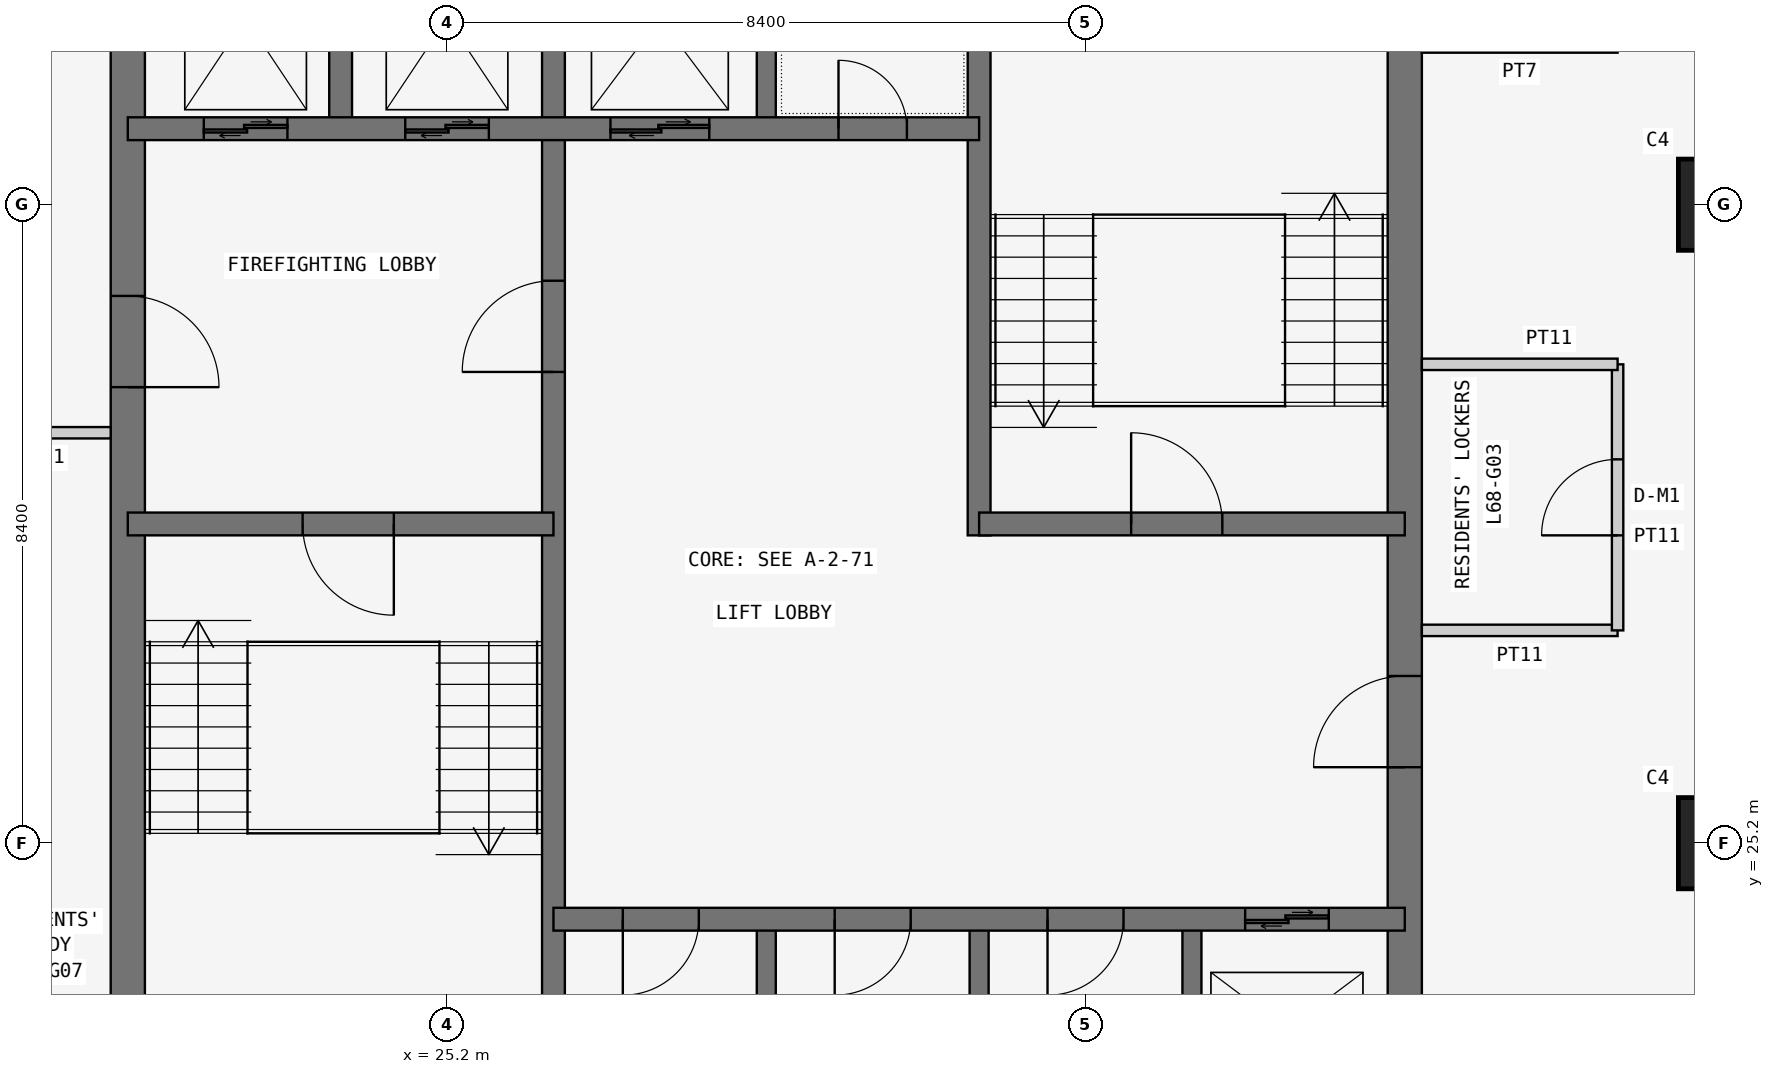
"""IFC4 building model, lengths in metres.
Left out: names, types, materials, properties, quantities, classifications, styles, units other than length and angle.
Written with IfcOpenShell. Run it as: python <this file> out.ifc"""

import sys

from ifc_helpers import new_model, si_unit, direction, frame, frame_2d, origin, origin_2d, place, context, subcontext, project, spatial, rectangle, extrude, element, fill, save


model = new_model("IFC4")
c1 = context("Model", 3, precision=1e-05, world=origin(), true_north=direction((0.0, 1.0)))
c2 = subcontext(c1, "Body", "Model", "MODEL_VIEW")
j1 = project(units=[si_unit("LENGTHUNIT", "METRE"), si_unit("PLANEANGLEUNIT", "RADIAN")], contexts=[c1])
p1 = place(None, origin())
s1 = spatial("IfcSite", under=j1, at=p1, CompositionType="ELEMENT")
p2 = place(p1, origin())
s2 = spatial("IfcBuilding", under=s1, at=p2, CompositionType="ELEMENT")
p3 = place(p2, frame((0.0, 0.0, 261.3)))
s3 = spatial("IfcBuildingStorey", under=s2, at=p3, CompositionType="ELEMENT", Elevation=261.3)
for number, where, z_axis, x_axis in (
    (1, (42.0, 25.2, 0.0), (0.0, 0.0, 1.0), (1.0, 0.0, 0.0)),
    (2, (42.0, 33.6, 0.0), (0.0, 0.0, 1.0), (1.0, 0.0, 0.0)),
):
    element("IfcColumn", number, at=place(p3, frame(where, z_axis=z_axis, x_axis=x_axis)), inside=s3, PredefinedType="COLUMN", context=c2, shape_type="SweptSolid", body=[
        extrude(rectangle(XDim=1.2, YDim=1.2, at=origin_2d()), origin(), (0.0, 0.0, 1.0), 3.6),
    ])
p4 = place(p3, frame((37.8, 21.0, 0.0), z_axis=(0.0, 0.0, 1.0), x_axis=(0.0, 1.0, 0.0)))
e3 = element("IfcWall", 3, at=p4, inside=s3, PredefinedType="SHEAR", context=c2, shape_type="SweptSolid", body=[
    extrude(rectangle(XDim=17.025, YDim=0.45, at=frame_2d((8.512, 0.0))), origin(), (0.0, 0.0, 1.0), 3.6),
])
p5 = place(p4, frame((5.2, 0.0, 0.0)))
e4 = element("IfcOpeningElement", 4, at=p5, cuts=e3, PredefinedType="OPENING", context=c2, shape_type="SweptSolid", body=[
    extrude(rectangle(XDim=1.2, YDim=2.1, at=frame_2d((0.6, 1.05))), frame((0.0, 0.235, 0.0), z_axis=(0.0, -1.0, 0.0), x_axis=(1.0, 0.0, 0.0)), (0.0, 0.0, 1.0), 0.47),
])
p6 = place(p3, frame((21.0, 37.8, 0.0), z_axis=(0.0, 0.0, 1.0), x_axis=(0.0, -1.0, 0.0)))
e5 = element("IfcWall", 5, at=p6, inside=s3, PredefinedType="SHEAR", context=c2, shape_type="SweptSolid", body=[
    extrude(rectangle(XDim=17.025, YDim=0.45, at=frame_2d((8.513, 0.0))), origin(), (0.0, 0.0, 1.0), 3.6),
])
p7 = place(p6, frame((5.4, 0.0, 0.0)))
e6 = element("IfcOpeningElement", 6, at=p7, cuts=e5, PredefinedType="OPENING", context=c2, shape_type="SweptSolid", body=[
    extrude(rectangle(XDim=1.2, YDim=2.1, at=frame_2d((0.6, 1.05))), frame((0.0, 0.235, 0.0), z_axis=(0.0, -1.0, 0.0), x_axis=(1.0, 0.0, 0.0)), (0.0, 0.0, 1.0), 0.47),
])
p8 = place(p3, frame((26.6, 21.0, 0.0), z_axis=(0.0, 0.0, 1.0), x_axis=(0.0, 1.0, 0.0)))
e7 = element("IfcWall", 7, at=p8, inside=s3, PredefinedType="SHEAR", context=c2, shape_type="SweptSolid", body=[
    extrude(rectangle(XDim=16.8, YDim=0.3, at=frame_2d((8.4, 0.0))), origin(), (0.0, 0.0, 1.0), 3.6),
])
p9 = place(p8, frame((10.4, 0.0, 0.0)))
e8 = element("IfcOpeningElement", 8, at=p9, cuts=e7, PredefinedType="OPENING", context=c2, shape_type="SweptSolid", body=[
    extrude(rectangle(XDim=1.2, YDim=2.1, at=frame_2d((0.6, 1.05))), frame((0.0, 0.16, 0.0), z_axis=(0.0, -1.0, 0.0), x_axis=(1.0, 0.0, 0.0)), (0.0, 0.0, 1.0), 0.32),
])
p10 = place(p3, frame((21.0, 29.4, 0.0), z_axis=(0.0, 0.0, 1.0), x_axis=(1.0, 0.0, 0.0)))
e9 = element("IfcWall", 9, at=p10, inside=s3, PredefinedType="SHEAR", context=c2, shape_type="SweptSolid", body=[
    extrude(rectangle(XDim=5.6, YDim=0.3, at=frame_2d((2.8, 0.0))), origin(), (0.0, 0.0, 1.0), 3.6),
])
p11 = place(p10, frame((2.3, 0.0, 0.0)))
e10 = element("IfcOpeningElement", 10, at=p11, cuts=e9, PredefinedType="OPENING", context=c2, shape_type="SweptSolid", body=[
    extrude(rectangle(XDim=1.2, YDim=2.1, at=frame_2d((0.6, 1.05))), frame((0.0, 0.16, 0.0), z_axis=(0.0, -1.0, 0.0), x_axis=(1.0, 0.0, 0.0)), (0.0, 0.0, 1.0), 0.32),
])
p12 = place(p3, frame((21.0, 34.6, 0.0), z_axis=(0.0, 0.0, 1.0), x_axis=(1.0, 0.0, 0.0)))
e11 = element("IfcWall", 11, at=p12, inside=s3, PredefinedType="SHEAR", context=c2, shape_type="SweptSolid", body=[
    extrude(rectangle(XDim=11.2, YDim=0.3, at=frame_2d((5.6, 0.0))), origin(), (0.0, 0.0, 1.0), 3.6),
])
p13 = place(p12, frame((9.35, 0.0, 0.0)))
e12 = element("IfcOpeningElement", 12, at=p13, cuts=e11, PredefinedType="OPENING", context=c2, shape_type="SweptSolid", body=[
    extrude(rectangle(XDim=0.9, YDim=2.1, at=frame_2d((0.45, 1.05))), frame((0.0, 0.16, 0.0), z_axis=(0.0, -1.0, 0.0), x_axis=(1.0, 0.0, 0.0)), (0.0, 0.0, 1.0), 0.32),
])
p14 = place(p12, frame((1.0, 0.0, 0.0)))
e13 = element("IfcOpeningElement", 13, at=p14, cuts=e11, PredefinedType="OPENING", context=c2, shape_type="SweptSolid", body=[
    extrude(rectangle(XDim=1.1, YDim=2.1, at=frame_2d((0.55, 1.05))), frame((0.0, 0.16, 0.0), z_axis=(0.0, -1.0, 0.0), x_axis=(1.0, 0.0, 0.0)), (0.0, 0.0, 1.0), 0.32),
])
p15 = place(p12, frame((3.65, 0.0, 0.0)))
e14 = element("IfcOpeningElement", 14, at=p15, cuts=e11, PredefinedType="OPENING", context=c2, shape_type="SweptSolid", body=[
    extrude(rectangle(XDim=1.1, YDim=2.1, at=frame_2d((0.55, 1.05))), frame((0.0, 0.16, 0.0), z_axis=(0.0, -1.0, 0.0), x_axis=(1.0, 0.0, 0.0)), (0.0, 0.0, 1.0), 0.32),
])
p16 = place(p12, frame((6.35, 0.0, 0.0)))
e15 = element("IfcOpeningElement", 15, at=p16, cuts=e11, PredefinedType="OPENING", context=c2, shape_type="SweptSolid", body=[
    extrude(rectangle(XDim=1.3, YDim=2.1, at=frame_2d((0.65, 1.05))), frame((0.0, 0.16, 0.0), z_axis=(0.0, -1.0, 0.0), x_axis=(1.0, 0.0, 0.0)), (0.0, 0.0, 1.0), 0.32),
])
p17 = place(p3, frame((23.8, 34.6, 0.0), z_axis=(0.0, 0.0, 1.0), x_axis=(0.0, 1.0, 0.0)))
e16 = element("IfcWall", 16, at=p17, inside=s3, PredefinedType="SHEAR", context=c2, shape_type="SweptSolid", body=[
    extrude(rectangle(XDim=3.2, YDim=0.3, at=frame_2d((1.6, 0.0))), origin(), (0.0, 0.0, 1.0), 3.6),
])
p18 = place(p3, frame((26.6, 24.2, 0.0), z_axis=(0.0, 0.0, 1.0), x_axis=(1.0, 0.0, 0.0)))
e17 = element("IfcWall", 17, at=p18, inside=s3, PredefinedType="SHEAR", context=c2, shape_type="SweptSolid", body=[
    extrude(rectangle(XDim=11.2, YDim=0.3, at=frame_2d((5.6, 0.0))), origin(), (0.0, 0.0, 1.0), 3.6),
])
p19 = place(p18, frame((0.913, 0.0, 0.0)))
e18 = element("IfcOpeningElement", 18, at=p19, cuts=e17, PredefinedType="OPENING", context=c2, shape_type="SweptSolid", body=[
    extrude(rectangle(XDim=1.0, YDim=2.1, at=frame_2d((0.5, 1.05))), frame((0.0, 0.16, 0.0), z_axis=(0.0, -1.0, 0.0), x_axis=(1.0, 0.0, 0.0)), (0.0, 0.0, 1.0), 0.32),
])
p20 = place(p18, frame((3.7, 0.0, 0.0)))
e19 = element("IfcOpeningElement", 19, at=p20, cuts=e17, PredefinedType="OPENING", context=c2, shape_type="SweptSolid", body=[
    extrude(rectangle(XDim=1.0, YDim=2.1, at=frame_2d((0.5, 1.05))), frame((0.0, 0.16, 0.0), z_axis=(0.0, -1.0, 0.0), x_axis=(1.0, 0.0, 0.0)), (0.0, 0.0, 1.0), 0.32),
])
p21 = place(p18, frame((6.5, 0.0, 0.0)))
e20 = element("IfcOpeningElement", 20, at=p21, cuts=e17, PredefinedType="OPENING", context=c2, shape_type="SweptSolid", body=[
    extrude(rectangle(XDim=1.0, YDim=2.1, at=frame_2d((0.5, 1.05))), frame((0.0, 0.16, 0.0), z_axis=(0.0, -1.0, 0.0), x_axis=(1.0, 0.0, 0.0)), (0.0, 0.0, 1.0), 0.32),
])
p22 = place(p18, frame((9.1, 0.0, 0.0)))
e21 = element("IfcOpeningElement", 21, at=p22, cuts=e17, PredefinedType="OPENING", context=c2, shape_type="SweptSolid", body=[
    extrude(rectangle(XDim=1.1, YDim=2.1, at=frame_2d((0.55, 1.05))), frame((0.0, 0.16, 0.0), z_axis=(0.0, -1.0, 0.0), x_axis=(1.0, 0.0, 0.0)), (0.0, 0.0, 1.0), 0.32),
])
p23 = place(p3, frame((32.2, 29.25, 0.0), z_axis=(0.0, 0.0, 1.0), x_axis=(0.0, 1.0, 0.0)))
e22 = element("IfcWall", 22, at=p23, inside=s3, PredefinedType="SHEAR", context=c2, shape_type="SweptSolid", body=[
    extrude(rectangle(XDim=8.55, YDim=0.3, at=frame_2d((4.275, 0.0))), origin(), (0.0, 0.0, 1.0), 3.6),
])
p24 = place(p3, frame((32.2, 29.4, 0.0), z_axis=(0.0, 0.0, 1.0), x_axis=(1.0, 0.0, 0.0)))
e23 = element("IfcWall", 23, at=p24, inside=s3, PredefinedType="SHEAR", context=c2, shape_type="SweptSolid", body=[
    extrude(rectangle(XDim=5.6, YDim=0.3, at=frame_2d((2.8, 0.0))), origin(), (0.0, 0.0, 1.0), 3.6),
])
p25 = place(p24, frame((2.0, 0.0, 0.0)))
e24 = element("IfcOpeningElement", 24, at=p25, cuts=e23, PredefinedType="OPENING", context=c2, shape_type="SweptSolid", body=[
    extrude(rectangle(XDim=1.2, YDim=2.1, at=frame_2d((0.6, 1.05))), frame((0.0, 0.16, 0.0), z_axis=(0.0, -1.0, 0.0), x_axis=(1.0, 0.0, 0.0)), (0.0, 0.0, 1.0), 0.32),
])
for number, where, z_axis, x_axis in (
    (25, (29.4, 21.0, 0.0), (0.0, 0.0, 1.0), (0.0, 1.0, 0.0)),
    (26, (32.2, 21.0, 0.0), (0.0, 0.0, 1.0), (0.0, 1.0, 0.0)),
    (27, (35.0, 21.0, 0.0), (0.0, 0.0, 1.0), (0.0, 1.0, 0.0)),
    (28, (29.4, 34.6, 0.0), (0.0, 0.0, 1.0), (0.0, 1.0, 0.0)),
):
    element("IfcWall", number, at=place(p3, frame(where, z_axis=z_axis, x_axis=x_axis)), inside=s3, PredefinedType="SHEAR", context=c2, shape_type="SweptSolid", body=[
        extrude(rectangle(XDim=3.2, YDim=0.25, at=frame_2d((1.6, 0.0))), origin(), (0.0, 0.0, 1.0), 3.6),
    ])
p26 = place(p3, frame((38.025, 28.0, 0.0), z_axis=(0.0, 0.0, 1.0), x_axis=(1.0, 0.0, 0.0)))
e29 = element("IfcWall", 29, at=p26, inside=s3, PredefinedType="PARTITIONING", context=c2, shape_type="SweptSolid", body=[
    extrude(rectangle(XDim=2.575, YDim=0.15, at=frame_2d((1.288, 0.0))), origin(), (0.0, 0.0, 1.0), 3.45),
])
p27 = place(p3, frame((40.6, 28.0, 0.0), z_axis=(0.0, 0.0, 1.0), x_axis=(0.0, 1.0, 0.0)))
e30 = element("IfcWall", 30, at=p27, inside=s3, PredefinedType="PARTITIONING", context=c2, shape_type="SweptSolid", body=[
    extrude(rectangle(XDim=3.5, YDim=0.15, at=frame_2d((1.75, 0.0))), origin(), (0.0, 0.0, 1.0), 3.45),
])
p28 = place(p27, frame((1.25, 0.0, 0.0)))
e31 = element("IfcOpeningElement", 31, at=p28, cuts=e30, PredefinedType="OPENING", context=c2, shape_type="SweptSolid", body=[
    extrude(rectangle(XDim=1.0, YDim=2.1, at=frame_2d((0.5, 1.05))), frame((0.0, 0.085, 0.0), z_axis=(0.0, -1.0, 0.0), x_axis=(1.0, 0.0, 0.0)), (0.0, 0.0, 1.0), 0.17),
])
p29 = place(p3, frame((40.6, 31.5, 0.0), z_axis=(0.0, 0.0, 1.0), x_axis=(-1.0, 0.0, 0.0)))
e32 = element("IfcWall", 32, at=p29, inside=s3, PredefinedType="PARTITIONING", context=c2, shape_type="SweptSolid", body=[
    extrude(rectangle(XDim=2.575, YDim=0.15, at=frame_2d((1.288, 0.0))), origin(), (0.0, 0.0, 1.0), 3.45),
])
p30 = place(p3, frame((38.025, 35.7, 0.0), z_axis=(0.0, 0.0, 1.0), x_axis=(1.0, 0.0, 0.0)))
e33 = element("IfcWall", 33, at=p30, inside=s3, PredefinedType="PARTITIONING", context=c2, shape_type="SweptSolid", body=[
    extrude(rectangle(XDim=2.575, YDim=0.2, at=frame_2d((1.288, 0.0))), origin(), (0.0, 0.0, 1.0), 3.45),
])
p31 = place(p3, frame((20.775, 30.6, 0.0), z_axis=(0.0, 0.0, 1.0), x_axis=(-1.0, 0.0, 0.0)))
e34 = element("IfcWall", 34, at=p31, inside=s3, PredefinedType="PARTITIONING", context=c2, shape_type="SweptSolid", body=[
    extrude(rectangle(XDim=1.825, YDim=0.15, at=frame_2d((0.913, 0.0))), origin(), (0.0, 0.0, 1.0), 3.45),
])
p32 = place(p28, origin())
e35 = element("IfcDoor", 35, at=p32, inside=s3, OperationType="SINGLE_SWING_LEFT", PredefinedType="DOOR", context=c2, shape_type="SweptSolid", body=[
    extrude(rectangle(XDim=1.0, YDim=2.1, at=frame_2d((0.5, 1.05))), frame((0.0, 0.025, 0.0), z_axis=(0.0, -1.0, 0.0), x_axis=(1.0, 0.0, 0.0)), (0.0, 0.0, 1.0), 0.05),
])
fill(e31, e35)
p33 = place(p7, origin())
e36 = element("IfcDoor", 36, at=p33, inside=s3, OperationType="SINGLE_SWING_RIGHT", PredefinedType="DOOR", context=c2, shape_type="SweptSolid", body=[
    extrude(rectangle(XDim=1.2, YDim=2.1, at=frame_2d((0.6, 1.05))), frame((0.0, 0.025, 0.0), z_axis=(0.0, -1.0, 0.0), x_axis=(1.0, 0.0, 0.0)), (0.0, 0.0, 1.0), 0.05),
])
fill(e6, e36)
p34 = place(p11, frame((1.2, 0.0, 0.0), z_axis=(0.0, 0.0, 1.0), x_axis=(-1.0, 0.0, 0.0)))
e37 = element("IfcDoor", 37, at=p34, inside=s3, OperationType="SINGLE_SWING_LEFT", PredefinedType="DOOR", context=c2, shape_type="SweptSolid", body=[
    extrude(rectangle(XDim=1.2, YDim=2.1, at=frame_2d((0.6, 1.05))), frame((0.0, 0.025, 0.0), z_axis=(0.0, -1.0, 0.0), x_axis=(1.0, 0.0, 0.0)), (0.0, 0.0, 1.0), 0.05),
])
fill(e10, e37)
p35 = place(p9, origin())
e38 = element("IfcDoor", 38, at=p35, inside=s3, OperationType="SINGLE_SWING_LEFT", PredefinedType="DOOR", context=c2, shape_type="SweptSolid", body=[
    extrude(rectangle(XDim=1.2, YDim=2.1, at=frame_2d((0.6, 1.05))), frame((0.0, 0.025, 0.0), z_axis=(0.0, -1.0, 0.0), x_axis=(1.0, 0.0, 0.0)), (0.0, 0.0, 1.0), 0.05),
])
fill(e8, e38)
p36 = place(p5, origin())
e39 = element("IfcDoor", 39, at=p36, inside=s3, OperationType="SINGLE_SWING_LEFT", PredefinedType="DOOR", context=c2, shape_type="SweptSolid", body=[
    extrude(rectangle(XDim=1.2, YDim=2.1, at=frame_2d((0.6, 1.05))), frame((0.0, 0.025, 0.0), z_axis=(0.0, -1.0, 0.0), x_axis=(1.0, 0.0, 0.0)), (0.0, 0.0, 1.0), 0.05),
])
fill(e4, e39)
p37 = place(p25, origin())
e40 = element("IfcDoor", 40, at=p37, inside=s3, OperationType="SINGLE_SWING_LEFT", PredefinedType="DOOR", context=c2, shape_type="SweptSolid", body=[
    extrude(rectangle(XDim=1.2, YDim=2.1, at=frame_2d((0.6, 1.05))), frame((0.0, 0.025, 0.0), z_axis=(0.0, -1.0, 0.0), x_axis=(1.0, 0.0, 0.0)), (0.0, 0.0, 1.0), 0.05),
])
fill(e24, e40)
p38 = place(p13, origin())
e41 = element("IfcDoor", 41, at=p38, inside=s3, OperationType="SINGLE_SWING_LEFT", PredefinedType="DOOR", context=c2, shape_type="SweptSolid", body=[
    extrude(rectangle(XDim=0.9, YDim=2.1, at=frame_2d((0.45, 1.05))), frame((0.0, 0.025, 0.0), z_axis=(0.0, -1.0, 0.0), x_axis=(1.0, 0.0, 0.0)), (0.0, 0.0, 1.0), 0.05),
])
fill(e12, e41)
p39 = place(p19, frame((1.0, 0.0, 0.0), z_axis=(0.0, 0.0, 1.0), x_axis=(-1.0, 0.0, 0.0)))
e42 = element("IfcDoor", 42, at=p39, inside=s3, OperationType="SINGLE_SWING_RIGHT", PredefinedType="DOOR", context=c2, shape_type="SweptSolid", body=[
    extrude(rectangle(XDim=1.0, YDim=2.1, at=frame_2d((0.5, 1.05))), frame((0.0, 0.025, 0.0), z_axis=(0.0, -1.0, 0.0), x_axis=(1.0, 0.0, 0.0)), (0.0, 0.0, 1.0), 0.05),
])
fill(e18, e42)
p40 = place(p20, frame((1.0, 0.0, 0.0), z_axis=(0.0, 0.0, 1.0), x_axis=(-1.0, 0.0, 0.0)))
e43 = element("IfcDoor", 43, at=p40, inside=s3, OperationType="SINGLE_SWING_RIGHT", PredefinedType="DOOR", context=c2, shape_type="SweptSolid", body=[
    extrude(rectangle(XDim=1.0, YDim=2.1, at=frame_2d((0.5, 1.05))), frame((0.0, 0.025, 0.0), z_axis=(0.0, -1.0, 0.0), x_axis=(1.0, 0.0, 0.0)), (0.0, 0.0, 1.0), 0.05),
])
fill(e19, e43)
p41 = place(p21, frame((1.0, 0.0, 0.0), z_axis=(0.0, 0.0, 1.0), x_axis=(-1.0, 0.0, 0.0)))
e44 = element("IfcDoor", 44, at=p41, inside=s3, OperationType="SINGLE_SWING_RIGHT", PredefinedType="DOOR", context=c2, shape_type="SweptSolid", body=[
    extrude(rectangle(XDim=1.0, YDim=2.1, at=frame_2d((0.5, 1.05))), frame((0.0, 0.025, 0.0), z_axis=(0.0, -1.0, 0.0), x_axis=(1.0, 0.0, 0.0)), (0.0, 0.0, 1.0), 0.05),
])
fill(e20, e44)
p42 = place(p22, origin())
e45 = element("IfcDoor", 45, at=p42, inside=s3, OperationType="DOUBLE_DOOR_SLIDING", PredefinedType="DOOR", context=c2, shape_type="SweptSolid", body=[
    extrude(rectangle(XDim=1.1, YDim=2.1, at=frame_2d((0.55, 1.05))), frame((0.0, 0.025, 0.0), z_axis=(0.0, -1.0, 0.0), x_axis=(1.0, 0.0, 0.0)), (0.0, 0.0, 1.0), 0.05),
])
fill(e21, e45)
p43 = place(p14, origin())
e46 = element("IfcDoor", 46, at=p43, inside=s3, OperationType="DOUBLE_DOOR_SLIDING", PredefinedType="DOOR", context=c2, shape_type="SweptSolid", body=[
    extrude(rectangle(XDim=1.1, YDim=2.1, at=frame_2d((0.55, 1.05))), frame((0.0, 0.025, 0.0), z_axis=(0.0, -1.0, 0.0), x_axis=(1.0, 0.0, 0.0)), (0.0, 0.0, 1.0), 0.05),
])
fill(e13, e46)
p44 = place(p15, origin())
e47 = element("IfcDoor", 47, at=p44, inside=s3, OperationType="DOUBLE_DOOR_SLIDING", PredefinedType="DOOR", context=c2, shape_type="SweptSolid", body=[
    extrude(rectangle(XDim=1.1, YDim=2.1, at=frame_2d((0.55, 1.05))), frame((0.0, 0.025, 0.0), z_axis=(0.0, -1.0, 0.0), x_axis=(1.0, 0.0, 0.0)), (0.0, 0.0, 1.0), 0.05),
])
fill(e14, e47)
p45 = place(p16, origin())
e48 = element("IfcDoor", 48, at=p45, inside=s3, OperationType="DOUBLE_DOOR_SLIDING", PredefinedType="DOOR", context=c2, shape_type="SweptSolid", body=[
    extrude(rectangle(XDim=1.3, YDim=2.1, at=frame_2d((0.65, 1.05))), frame((0.0, 0.025, 0.0), z_axis=(0.0, -1.0, 0.0), x_axis=(1.0, 0.0, 0.0)), (0.0, 0.0, 1.0), 0.05),
])
fill(e15, e48)
save(model, sys.argv[1])
